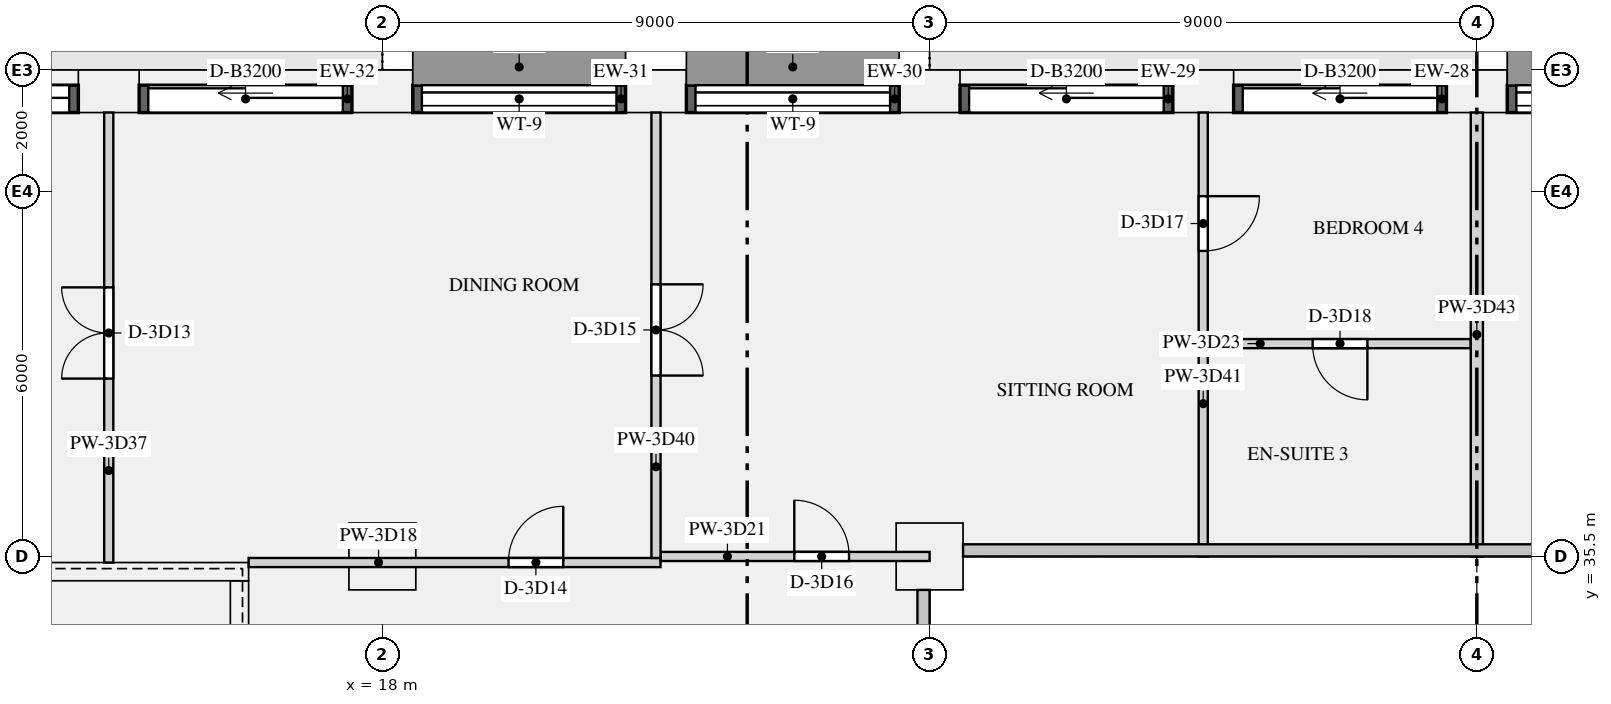
"""IFC4 building model, lengths in metres.
Left out: names, types, materials, properties, quantities, classifications, styles, units other than length and angle.
Written with IfcOpenShell. Run it as: python <this file> out.ifc"""

import sys

from ifc_helpers import new_model, si_unit, direction, frame, frame_2d, origin, origin_2d, place, context, subcontext, project, spatial, rectangle, extrude, element, fill, save


model = new_model("IFC4")
c1 = context("Model", 3, precision=1e-05, world=origin(), true_north=direction((0.0, 1.0)))
c2 = subcontext(c1, "Body", "Model", "MODEL_VIEW")
j1 = project(units=[si_unit("LENGTHUNIT", "METRE"), si_unit("PLANEANGLEUNIT", "RADIAN")], contexts=[c1])
p1 = place(None, origin())
s1 = spatial("IfcSite", under=j1, at=p1, CompositionType="ELEMENT")
p2 = place(p1, origin())
s2 = spatial("IfcBuilding", under=s1, at=p2, CompositionType="ELEMENT")
p3 = place(p2, frame((0.0, 0.0, 166.5)))
s3 = spatial("IfcBuildingStorey", under=s2, at=p3, CompositionType="ELEMENT", Elevation=166.5)
for number, where, z_axis, x_axis in (
    (1, (36.0, 43.15, 0.0), (0.0, 0.0, 1.0), (-1.0, 0.0, 0.0)),
    (2, (31.5, 43.15, 0.0), (0.0, 0.0, 1.0), (-1.0, 0.0, 0.0)),
    (3, (27.0, 43.15, 0.0), (0.0, 0.0, 1.0), (-1.0, 0.0, 0.0)),
    (4, (22.5, 43.15, 0.0), (0.0, 0.0, 1.0), (-1.0, 0.0, 0.0)),
    (5, (18.0, 43.15, 0.0), (0.0, 0.0, 1.0), (-1.0, 0.0, 0.0)),
    (6, (13.5, 43.15, 0.0), (0.0, 0.0, 1.0), (-1.0, 0.0, 0.0)),
):
    element("IfcColumn", number, at=place(p3, frame(where, z_axis=z_axis, x_axis=x_axis)), inside=s3, PredefinedType="USERDEFINED", context=c2, shape_type="SweptSolid", body=[
        extrude(rectangle(XDim=1.0, YDim=0.7, at=origin_2d()), origin(), (0.0, 0.0, 1.0), 3.15),
    ])
for number, where, z_axis, x_axis in (
    (7, (18.0, 35.5, 0.0), (0.0, 0.0, 1.0), (1.0, 0.0, 0.0)),
    (8, (27.0, 35.5, 0.0), (0.0, 0.0, 1.0), (1.0, 0.0, 0.0)),
):
    element("IfcColumn", number, at=place(p3, frame(where, z_axis=z_axis, x_axis=x_axis)), inside=s3, PredefinedType="COLUMN", context=c2, shape_type="SweptSolid", body=[
        extrude(rectangle(XDim=1.1, YDim=1.1, at=origin_2d()), origin(), (0.0, 0.0, 1.0), 3.15),
    ])
p4 = place(p3, frame((12.2, 35.25, 0.0), z_axis=(0.0, 0.0, 1.0), x_axis=(1.0, 0.0, 0.0)))
e9 = element("IfcWall", 9, at=p4, inside=s3, PredefinedType="SHEAR", context=c2, shape_type="SweptSolid", body=[
    extrude(rectangle(XDim=3.6, YDim=0.3, at=frame_2d((1.8, 0.0))), origin(), (0.0, 0.0, 1.0), 3.15),
])
p5 = place(p3, frame((15.65, 27.3, 0.0), z_axis=(0.0, 0.0, 1.0), x_axis=(0.0, 1.0, 0.0)))
e10 = element("IfcWall", 10, at=p5, inside=s3, PredefinedType="SHEAR", context=c2, shape_type="SweptSolid", body=[
    extrude(rectangle(XDim=7.8, YDim=0.3, at=frame_2d((3.9, 0.0))), origin(), (0.0, 0.0, 1.0), 3.15),
])
p6 = place(p3, frame((40.0, 43.025, 0.9), z_axis=(0.0, 0.0, 1.0), x_axis=(-1.0, 0.0, 0.0)))
e11 = element("IfcWall", 11, at=p6, inside=s3, PredefinedType="SOLIDWALL", context=c2, shape_type="SweptSolid", body=[
    extrude(rectangle(XDim=3.5, YDim=0.45, at=frame_2d((1.75, 0.0))), origin(), (0.0, 0.0, 1.0), 1.93),
])
p7 = place(p6, frame((0.15, 0.0, 0.15)))
e12 = element("IfcOpeningElement", 12, at=p7, cuts=e11, PredefinedType="OPENING", context=c2, shape_type="SweptSolid", body=[
    extrude(rectangle(XDim=3.2, YDim=1.5, at=frame_2d((1.6, 0.75))), frame((0.0, 0.235, 0.0), z_axis=(0.0, -1.0, 0.0), x_axis=(1.0, 0.0, 0.0)), (0.0, 0.0, 1.0), 0.47),
])
p8 = place(p3, frame((35.5, 43.025, 0.0), z_axis=(0.0, 0.0, 1.0), x_axis=(-1.0, 0.0, 0.0)))
e13 = element("IfcWall", 13, at=p8, inside=s3, PredefinedType="SOLIDWALL", context=c2, shape_type="SweptSolid", body=[
    extrude(rectangle(XDim=3.5, YDim=0.45, at=frame_2d((1.75, 0.0))), origin(), (0.0, 0.0, 1.0), 2.83),
])
p9 = place(p8, frame((0.15, 0.0, 0.0)))
e14 = element("IfcOpeningElement", 14, at=p9, cuts=e13, PredefinedType="OPENING", context=c2, shape_type="SweptSolid", body=[
    extrude(rectangle(XDim=3.2, YDim=2.3, at=frame_2d((1.6, 1.15))), frame((0.0, 0.235, 0.0), z_axis=(0.0, -1.0, 0.0), x_axis=(1.0, 0.0, 0.0)), (0.0, 0.0, 1.0), 0.47),
])
p10 = place(p3, frame((31.0, 43.025, 0.0), z_axis=(0.0, 0.0, 1.0), x_axis=(-1.0, 0.0, 0.0)))
e15 = element("IfcWall", 15, at=p10, inside=s3, PredefinedType="SOLIDWALL", context=c2, shape_type="SweptSolid", body=[
    extrude(rectangle(XDim=3.5, YDim=0.45, at=frame_2d((1.75, 0.0))), origin(), (0.0, 0.0, 1.0), 2.83),
])
p11 = place(p10, frame((0.15, 0.0, 0.0)))
e16 = element("IfcOpeningElement", 16, at=p11, cuts=e15, PredefinedType="OPENING", context=c2, shape_type="SweptSolid", body=[
    extrude(rectangle(XDim=3.2, YDim=2.3, at=frame_2d((1.6, 1.15))), frame((0.0, 0.235, 0.0), z_axis=(0.0, -1.0, 0.0), x_axis=(1.0, 0.0, 0.0)), (0.0, 0.0, 1.0), 0.47),
])
p12 = place(p3, frame((26.5, 43.025, 0.9), z_axis=(0.0, 0.0, 1.0), x_axis=(-1.0, 0.0, 0.0)))
e17 = element("IfcWall", 17, at=p12, inside=s3, PredefinedType="SOLIDWALL", context=c2, shape_type="SweptSolid", body=[
    extrude(rectangle(XDim=3.5, YDim=0.45, at=frame_2d((1.75, 0.0))), origin(), (0.0, 0.0, 1.0), 1.93),
])
p13 = place(p12, frame((0.15, 0.0, 0.15)))
e18 = element("IfcOpeningElement", 18, at=p13, cuts=e17, PredefinedType="OPENING", context=c2, shape_type="SweptSolid", body=[
    extrude(rectangle(XDim=3.2, YDim=1.5, at=frame_2d((1.6, 0.75))), frame((0.0, 0.235, 0.0), z_axis=(0.0, -1.0, 0.0), x_axis=(1.0, 0.0, 0.0)), (0.0, 0.0, 1.0), 0.47),
])
p14 = place(p3, frame((22.0, 43.025, 0.9), z_axis=(0.0, 0.0, 1.0), x_axis=(-1.0, 0.0, 0.0)))
e19 = element("IfcWall", 19, at=p14, inside=s3, PredefinedType="SOLIDWALL", context=c2, shape_type="SweptSolid", body=[
    extrude(rectangle(XDim=3.5, YDim=0.45, at=frame_2d((1.75, 0.0))), origin(), (0.0, 0.0, 1.0), 1.93),
])
p15 = place(p14, frame((0.15, 0.0, 0.15)))
e20 = element("IfcOpeningElement", 20, at=p15, cuts=e19, PredefinedType="OPENING", context=c2, shape_type="SweptSolid", body=[
    extrude(rectangle(XDim=3.2, YDim=1.5, at=frame_2d((1.6, 0.75))), frame((0.0, 0.235, 0.0), z_axis=(0.0, -1.0, 0.0), x_axis=(1.0, 0.0, 0.0)), (0.0, 0.0, 1.0), 0.47),
])
p16 = place(p3, frame((17.5, 43.025, 0.0), z_axis=(0.0, 0.0, 1.0), x_axis=(-1.0, 0.0, 0.0)))
e21 = element("IfcWall", 21, at=p16, inside=s3, PredefinedType="SOLIDWALL", context=c2, shape_type="SweptSolid", body=[
    extrude(rectangle(XDim=3.5, YDim=0.45, at=frame_2d((1.75, 0.0))), origin(), (0.0, 0.0, 1.0), 2.83),
])
p17 = place(p16, frame((0.15, 0.0, 0.0)))
e22 = element("IfcOpeningElement", 22, at=p17, cuts=e21, PredefinedType="OPENING", context=c2, shape_type="SweptSolid", body=[
    extrude(rectangle(XDim=3.2, YDim=2.3, at=frame_2d((1.6, 1.15))), frame((0.0, 0.235, 0.0), z_axis=(0.0, -1.0, 0.0), x_axis=(1.0, 0.0, 0.0)), (0.0, 0.0, 1.0), 0.47),
])
p18 = place(p3, frame((13.0, 43.025, 0.0), z_axis=(0.0, 0.0, 1.0), x_axis=(-1.0, 0.0, 0.0)))
e23 = element("IfcWall", 23, at=p18, inside=s3, PredefinedType="SOLIDWALL", context=c2, shape_type="SweptSolid", body=[
    extrude(rectangle(XDim=3.3, YDim=0.45, at=frame_2d((1.65, 0.0))), origin(), (0.0, 0.0, 1.0), 2.83),
])
p19 = place(p18, frame((0.15, 0.0, 0.0)))
e24 = element("IfcOpeningElement", 24, at=p19, cuts=e23, PredefinedType="OPENING", context=c2, shape_type="SweptSolid", body=[
    extrude(rectangle(XDim=3.0, YDim=2.3, at=frame_2d((1.5, 1.15))), frame((0.0, 0.235, 0.0), z_axis=(0.0, -1.0, 0.0), x_axis=(1.0, 0.0, 0.0)), (0.0, 0.0, 1.0), 0.47),
])
p20 = place(p3, frame((15.8, 35.4, 0.0), z_axis=(0.0, 0.0, 1.0), x_axis=(1.0, 0.0, 0.0)))
e25 = element("IfcWall", 25, at=p20, inside=s3, PredefinedType="PARTITIONING", context=c2, shape_type="SweptSolid", body=[
    extrude(rectangle(XDim=6.775, YDim=0.15, at=frame_2d((3.387, 0.0))), origin(), (0.0, 0.0, 1.0), 2.83),
])
p21 = place(p20, frame((4.275, 0.0, 0.0)))
e26 = element("IfcOpeningElement", 26, at=p21, cuts=e25, PredefinedType="OPENING", context=c2, shape_type="SweptSolid", body=[
    extrude(rectangle(XDim=0.9, YDim=2.1, at=frame_2d((0.45, 1.05))), frame((0.0, 0.085, 0.0), z_axis=(0.0, -1.0, 0.0), x_axis=(1.0, 0.0, 0.0)), (0.0, 0.0, 1.0), 0.17),
])
p22 = place(p3, frame((22.575, 35.5, 0.0), z_axis=(0.0, 0.0, 1.0), x_axis=(1.0, 0.0, 0.0)))
e27 = element("IfcWall", 27, at=p22, inside=s3, PredefinedType="PARTITIONING", context=c2, shape_type="SweptSolid", body=[
    extrude(rectangle(XDim=4.425, YDim=0.15, at=frame_2d((2.212, 0.0))), origin(), (0.0, 0.0, 1.0), 2.83),
])
p23 = place(p22, frame((2.2, 0.0, 0.0)))
e28 = element("IfcOpeningElement", 28, at=p23, cuts=e27, PredefinedType="OPENING", context=c2, shape_type="SweptSolid", body=[
    extrude(rectangle(XDim=0.9, YDim=2.1, at=frame_2d((0.45, 1.05))), frame((0.0, 0.085, 0.0), z_axis=(0.0, -1.0, 0.0), x_axis=(1.0, 0.0, 0.0)), (0.0, 0.0, 1.0), 0.17),
])
p24 = place(p3, frame((31.575, 39.0, 0.0), z_axis=(0.0, 0.0, 1.0), x_axis=(1.0, 0.0, 0.0)))
e29 = element("IfcWall", 29, at=p24, inside=s3, PredefinedType="PARTITIONING", context=c2, shape_type="SweptSolid", body=[
    extrude(rectangle(XDim=4.325, YDim=0.15, at=frame_2d((2.163, 0.0))), origin(), (0.0, 0.0, 1.0), 2.83),
])
p25 = place(p24, frame((1.725, 0.0, 0.0)))
e30 = element("IfcOpeningElement", 30, at=p25, cuts=e29, PredefinedType="OPENING", context=c2, shape_type="SweptSolid", body=[
    extrude(rectangle(XDim=0.9, YDim=2.1, at=frame_2d((0.45, 1.05))), frame((0.0, 0.085, 0.0), z_axis=(0.0, -1.0, 0.0), x_axis=(1.0, 0.0, 0.0)), (0.0, 0.0, 1.0), 0.17),
])
p26 = place(p3, frame((13.5, 35.4, 0.0), z_axis=(0.0, 0.0, 1.0), x_axis=(0.0, 1.0, 0.0)))
e31 = element("IfcWall", 31, at=p26, inside=s3, PredefinedType="PARTITIONING", context=c2, shape_type="SweptSolid", body=[
    extrude(rectangle(XDim=7.4, YDim=0.15, at=frame_2d((3.7, 0.0))), origin(), (0.0, 0.0, 1.0), 2.83),
])
p27 = place(p26, frame((3.025, 0.0, 0.0)))
e32 = element("IfcOpeningElement", 32, at=p27, cuts=e31, PredefinedType="OPENING", context=c2, shape_type="SweptSolid", body=[
    extrude(rectangle(XDim=1.5, YDim=2.1, at=frame_2d((0.75, 1.05))), frame((0.0, 0.085, 0.0), z_axis=(0.0, -1.0, 0.0), x_axis=(1.0, 0.0, 0.0)), (0.0, 0.0, 1.0), 0.17),
])
p28 = place(p3, frame((22.5, 35.475, 0.0), z_axis=(0.0, 0.0, 1.0), x_axis=(0.0, 1.0, 0.0)))
e33 = element("IfcWall", 33, at=p28, inside=s3, PredefinedType="PARTITIONING", context=c2, shape_type="SweptSolid", body=[
    extrude(rectangle(XDim=7.325, YDim=0.15, at=frame_2d((3.663, 0.0))), origin(), (0.0, 0.0, 1.0), 2.83),
])
p29 = place(p28, frame((3.0, 0.0, 0.0)))
e34 = element("IfcOpeningElement", 34, at=p29, cuts=e33, PredefinedType="OPENING", context=c2, shape_type="SweptSolid", body=[
    extrude(rectangle(XDim=1.5, YDim=2.1, at=frame_2d((0.75, 1.05))), frame((0.0, 0.085, 0.0), z_axis=(0.0, -1.0, 0.0), x_axis=(1.0, 0.0, 0.0)), (0.0, 0.0, 1.0), 0.17),
])
p30 = place(p3, frame((31.5, 35.5, 0.0), z_axis=(0.0, 0.0, 1.0), x_axis=(0.0, 1.0, 0.0)))
e35 = element("IfcWall", 35, at=p30, inside=s3, PredefinedType="PARTITIONING", context=c2, shape_type="SweptSolid", body=[
    extrude(rectangle(XDim=7.3, YDim=0.15, at=frame_2d((3.65, 0.0))), origin(), (0.0, 0.0, 1.0), 2.83),
])
p31 = place(p30, frame((5.025, 0.0, 0.0)))
e36 = element("IfcOpeningElement", 36, at=p31, cuts=e35, PredefinedType="OPENING", context=c2, shape_type="SweptSolid", body=[
    extrude(rectangle(XDim=0.9, YDim=2.1, at=frame_2d((0.45, 1.05))), frame((0.0, 0.085, 0.0), z_axis=(0.0, -1.0, 0.0), x_axis=(1.0, 0.0, 0.0)), (0.0, 0.0, 1.0), 0.17),
])
p32 = place(p3, frame((36.0, 35.5, 0.0), z_axis=(0.0, 0.0, 1.0), x_axis=(0.0, 1.0, 0.0)))
e37 = element("IfcWall", 37, at=p32, inside=s3, PredefinedType="PARTITIONING", context=c2, shape_type="SweptSolid", body=[
    extrude(rectangle(XDim=7.3, YDim=0.2, at=frame_2d((3.65, 0.0))), origin(), (0.0, 0.0, 1.0), 2.83),
])
p33 = place(p7, origin())
e38 = element("IfcWindow", 38, at=p33, inside=s3, PartitioningType="SINGLE_PANEL", PredefinedType="WINDOW", context=c2, shape_type="SweptSolid", body=[
    extrude(rectangle(XDim=3.2, YDim=1.5, at=frame_2d((1.6, 0.75))), frame((0.0, -0.065, 0.0), z_axis=(0.0, -1.0, 0.0), x_axis=(1.0, 0.0, 0.0)), (0.0, 0.0, 1.0), 0.06),
])
fill(e12, e38)
p34 = place(p9, origin())
e39 = element("IfcDoor", 39, at=p34, inside=s3, OperationType="SLIDING_TO_LEFT", PredefinedType="DOOR", context=c2, shape_type="SweptSolid", body=[
    extrude(rectangle(XDim=3.2, YDim=2.3, at=frame_2d((1.6, 1.15))), frame((0.0, -0.07, 0.0), z_axis=(0.0, -1.0, 0.0), x_axis=(1.0, 0.0, 0.0)), (0.0, 0.0, 1.0), 0.05),
])
fill(e14, e39)
p35 = place(p11, origin())
e40 = element("IfcDoor", 40, at=p35, inside=s3, OperationType="SLIDING_TO_LEFT", PredefinedType="DOOR", context=c2, shape_type="SweptSolid", body=[
    extrude(rectangle(XDim=3.2, YDim=2.3, at=frame_2d((1.6, 1.15))), frame((0.0, -0.07, 0.0), z_axis=(0.0, -1.0, 0.0), x_axis=(1.0, 0.0, 0.0)), (0.0, 0.0, 1.0), 0.05),
])
fill(e16, e40)
p36 = place(p13, origin())
e41 = element("IfcWindow", 41, at=p36, inside=s3, PartitioningType="SINGLE_PANEL", PredefinedType="WINDOW", context=c2, shape_type="SweptSolid", body=[
    extrude(rectangle(XDim=3.2, YDim=1.5, at=frame_2d((1.6, 0.75))), frame((0.0, -0.065, 0.0), z_axis=(0.0, -1.0, 0.0), x_axis=(1.0, 0.0, 0.0)), (0.0, 0.0, 1.0), 0.06),
])
fill(e18, e41)
p37 = place(p15, origin())
e42 = element("IfcWindow", 42, at=p37, inside=s3, PartitioningType="SINGLE_PANEL", PredefinedType="WINDOW", context=c2, shape_type="SweptSolid", body=[
    extrude(rectangle(XDim=3.2, YDim=1.5, at=frame_2d((1.6, 0.75))), frame((0.0, -0.065, 0.0), z_axis=(0.0, -1.0, 0.0), x_axis=(1.0, 0.0, 0.0)), (0.0, 0.0, 1.0), 0.06),
])
fill(e20, e42)
p38 = place(p17, origin())
e43 = element("IfcDoor", 43, at=p38, inside=s3, OperationType="SLIDING_TO_LEFT", PredefinedType="DOOR", context=c2, shape_type="SweptSolid", body=[
    extrude(rectangle(XDim=3.2, YDim=2.3, at=frame_2d((1.6, 1.15))), frame((0.0, -0.07, 0.0), z_axis=(0.0, -1.0, 0.0), x_axis=(1.0, 0.0, 0.0)), (0.0, 0.0, 1.0), 0.05),
])
fill(e22, e43)
p39 = place(p19, origin())
e44 = element("IfcDoor", 44, at=p39, inside=s3, OperationType="SLIDING_TO_LEFT", PredefinedType="DOOR", context=c2, shape_type="SweptSolid", body=[
    extrude(rectangle(XDim=3.0, YDim=2.3, at=frame_2d((1.5, 1.15))), frame((0.0, -0.07, 0.0), z_axis=(0.0, -1.0, 0.0), x_axis=(1.0, 0.0, 0.0)), (0.0, 0.0, 1.0), 0.05),
])
fill(e24, e44)
p40 = place(p27, origin())
e45 = element("IfcDoor", 45, at=p40, inside=s3, OperationType="DOUBLE_DOOR_SINGLE_SWING", PredefinedType="DOOR", context=c2, shape_type="SweptSolid", body=[
    extrude(rectangle(XDim=1.5, YDim=2.1, at=frame_2d((0.75, 1.05))), frame((0.0, 0.025, 0.0), z_axis=(0.0, -1.0, 0.0), x_axis=(1.0, 0.0, 0.0)), (0.0, 0.0, 1.0), 0.05),
])
fill(e32, e45)
p41 = place(p21, origin())
e46 = element("IfcDoor", 46, at=p41, inside=s3, OperationType="SINGLE_SWING_RIGHT", PredefinedType="DOOR", context=c2, shape_type="SweptSolid", body=[
    extrude(rectangle(XDim=0.9, YDim=2.1, at=frame_2d((0.45, 1.05))), frame((0.0, 0.025, 0.0), z_axis=(0.0, -1.0, 0.0), x_axis=(1.0, 0.0, 0.0)), (0.0, 0.0, 1.0), 0.05),
])
fill(e26, e46)
p42 = place(p29, frame((1.5, 0.0, 0.0), z_axis=(0.0, 0.0, 1.0), x_axis=(-1.0, 0.0, 0.0)))
e47 = element("IfcDoor", 47, at=p42, inside=s3, OperationType="DOUBLE_DOOR_SINGLE_SWING", PredefinedType="DOOR", context=c2, shape_type="SweptSolid", body=[
    extrude(rectangle(XDim=1.5, YDim=2.1, at=frame_2d((0.75, 1.05))), frame((0.0, 0.025, 0.0), z_axis=(0.0, -1.0, 0.0), x_axis=(1.0, 0.0, 0.0)), (0.0, 0.0, 1.0), 0.05),
])
fill(e34, e47)
p43 = place(p23, origin())
e48 = element("IfcDoor", 48, at=p43, inside=s3, OperationType="SINGLE_SWING_LEFT", PredefinedType="DOOR", context=c2, shape_type="SweptSolid", body=[
    extrude(rectangle(XDim=0.9, YDim=2.1, at=frame_2d((0.45, 1.05))), frame((0.0, 0.025, 0.0), z_axis=(0.0, -1.0, 0.0), x_axis=(1.0, 0.0, 0.0)), (0.0, 0.0, 1.0), 0.05),
])
fill(e28, e48)
p44 = place(p31, frame((0.9, 0.0, 0.0), z_axis=(0.0, 0.0, 1.0), x_axis=(-1.0, 0.0, 0.0)))
e49 = element("IfcDoor", 49, at=p44, inside=s3, OperationType="SINGLE_SWING_LEFT", PredefinedType="DOOR", context=c2, shape_type="SweptSolid", body=[
    extrude(rectangle(XDim=0.9, YDim=2.1, at=frame_2d((0.45, 1.05))), frame((0.0, 0.025, 0.0), z_axis=(0.0, -1.0, 0.0), x_axis=(1.0, 0.0, 0.0)), (0.0, 0.0, 1.0), 0.05),
])
fill(e36, e49)
p45 = place(p25, frame((0.9, 0.0, 0.0), z_axis=(0.0, 0.0, 1.0), x_axis=(-1.0, 0.0, 0.0)))
e50 = element("IfcDoor", 50, at=p45, inside=s3, OperationType="SINGLE_SWING_LEFT", PredefinedType="DOOR", context=c2, shape_type="SweptSolid", body=[
    extrude(rectangle(XDim=0.9, YDim=2.1, at=frame_2d((0.45, 1.05))), frame((0.0, 0.025, 0.0), z_axis=(0.0, -1.0, 0.0), x_axis=(1.0, 0.0, 0.0)), (0.0, 0.0, 1.0), 0.05),
])
fill(e30, e50)
save(model, sys.argv[1])
